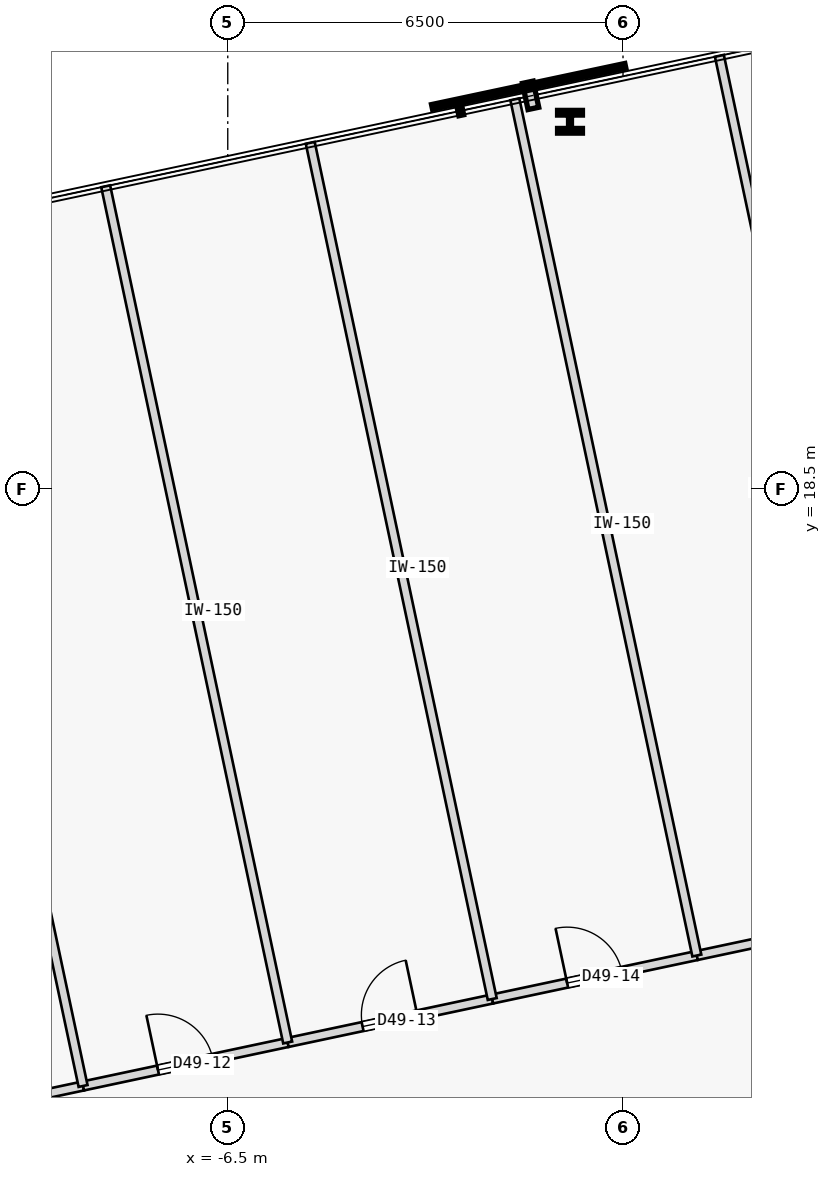
"""IFC4 building model, lengths in metres.
Left out: names, types, materials, properties, quantities, classifications, styles, units other than length and angle.
Written with IfcOpenShell. Run it as: python <this file> out.ifc"""

import sys

from ifc_helpers import new_model, si_unit, direction, frame, frame_2d, origin, origin_2d, place, context, subcontext, project, spatial, rectangle, i_section, extrude, element, fill, save


model = new_model("IFC4")
c1 = context("Model", 3, precision=1e-05, world=origin(), true_north=direction((0.0, 1.0)))
c2 = subcontext(c1, "Body", "Model", "MODEL_VIEW")
j1 = project(units=[si_unit("LENGTHUNIT", "METRE"), si_unit("PLANEANGLEUNIT", "RADIAN")], contexts=[c1])
p1 = place(None, origin())
s1 = spatial("IfcSite", under=j1, at=p1, CompositionType="ELEMENT")
p2 = place(p1, origin())
s2 = spatial("IfcBuilding", under=s1, at=p2, CompositionType="ELEMENT")
p3 = place(p2, frame((0.0, 0.0, 188.8)))
s3 = spatial("IfcBuildingStorey", under=s2, at=p3, CompositionType="ELEMENT", Elevation=188.8)
p4 = place(p3, frame((-0.872, 24.543, 0.0), z_axis=(0.0, 0.0, 1.0), x_axis=(1.0, 0.0, 0.0)))
e1 = element("IfcColumn", 1, at=p4, inside=s3, PredefinedType="COLUMN", context=c2, shape_type="SweptSolid", body=[
    extrude(i_section(OverallWidth=0.409, OverallDepth=0.374, WebThickness=0.048, FlangeThickness=0.077, FilletRadius=0.015, at=origin_2d()), origin(), (0.0, 0.0, 1.0), 3.4),
])
p5 = place(p3, frame((-12.243, 7.971, 0.0), z_axis=(0.0, 0.0, 1.0), x_axis=(0.978144956759, 0.207924129352, 0.0)))
e2 = element("IfcWall", 2, at=p5, inside=s3, PredefinedType="PARTITIONING", context=c2, shape_type="SweptSolid", body=[
    extrude(rectangle(XDim=3.439, YDim=0.15, at=frame_2d((1.72, 0.0))), origin(), (0.0, 0.0, 1.0), 3.175),
])
p6 = place(p5, frame((1.26, 0.0, 0.0)))
e3 = element("IfcOpeningElement", 3, at=p6, cuts=e2, PredefinedType="OPENING", context=c2, shape_type="SweptSolid", body=[
    extrude(rectangle(XDim=0.92, YDim=2.15, at=frame_2d((0.46, 1.075))), frame((0.0, 0.085, 0.0), z_axis=(0.0, -1.0, 0.0), x_axis=(1.0, 0.0, 0.0)), (0.0, 0.0, 1.0), 0.17),
])
p7 = place(p3, frame((-8.879, 8.687, 0.0), z_axis=(0.0, 0.0, 1.0), x_axis=(0.978154160849, 0.207880825506, 0.0)))
e4 = element("IfcWall", 4, at=p7, inside=s3, PredefinedType="PARTITIONING", context=c2, shape_type="SweptSolid", body=[
    extrude(rectangle(XDim=3.44, YDim=0.15, at=frame_2d((1.72, 0.0))), origin(), (0.0, 0.0, 1.0), 3.175),
])
p8 = place(p7, frame((1.26, 0.0, 0.0)))
e5 = element("IfcOpeningElement", 5, at=p8, cuts=e4, PredefinedType="OPENING", context=c2, shape_type="SweptSolid", body=[
    extrude(rectangle(XDim=0.92, YDim=2.15, at=frame_2d((0.46, 1.075))), frame((0.0, 0.085, 0.0), z_axis=(0.0, -1.0, 0.0), x_axis=(1.0, 0.0, 0.0)), (0.0, 0.0, 1.0), 0.17),
])
p9 = place(p3, frame((-5.515, 9.402, 0.0), z_axis=(0.0, 0.0, 1.0), x_axis=(0.978141887451, 0.207938567887, 0.0)))
e6 = element("IfcWall", 6, at=p9, inside=s3, PredefinedType="PARTITIONING", context=c2, shape_type="SweptSolid", body=[
    extrude(rectangle(XDim=3.439, YDim=0.15, at=frame_2d((1.719, 0.0))), origin(), (0.0, 0.0, 1.0), 3.175),
])
p10 = place(p9, frame((1.26, 0.0, 0.0)))
e7 = element("IfcOpeningElement", 7, at=p10, cuts=e6, PredefinedType="OPENING", context=c2, shape_type="SweptSolid", body=[
    extrude(rectangle(XDim=0.92, YDim=2.15, at=frame_2d((0.46, 1.075))), frame((0.0, 0.085, 0.0), z_axis=(0.0, -1.0, 0.0), x_axis=(1.0, 0.0, 0.0)), (0.0, 0.0, 1.0), 0.17),
])
p11 = place(p3, frame((-2.151, 10.117, 0.0), z_axis=(0.0, 0.0, 1.0), x_axis=(0.978157227602, 0.207866394808, 0.0)))
e8 = element("IfcWall", 8, at=p11, inside=s3, PredefinedType="PARTITIONING", context=c2, shape_type="SweptSolid", body=[
    extrude(rectangle(XDim=3.44, YDim=0.15, at=frame_2d((1.72, 0.0))), origin(), (0.0, 0.0, 1.0), 3.175),
])
p12 = place(p11, frame((1.26, 0.0, 0.0)))
e9 = element("IfcOpeningElement", 9, at=p12, cuts=e8, PredefinedType="OPENING", context=c2, shape_type="SweptSolid", body=[
    extrude(rectangle(XDim=0.92, YDim=2.15, at=frame_2d((0.46, 1.075))), frame((0.0, 0.085, 0.0), z_axis=(0.0, -1.0, 0.0), x_axis=(1.0, 0.0, 0.0)), (0.0, 0.0, 1.0), 0.17),
])
p13 = place(p3, frame((1.214, 10.832, 0.0), z_axis=(0.0, 0.0, 1.0), x_axis=(0.978141887451, 0.207938567887, 0.0)))
e10 = element("IfcWall", 10, at=p13, inside=s3, PredefinedType="PARTITIONING", context=c2, shape_type="SweptSolid", body=[
    extrude(rectangle(XDim=3.439, YDim=0.15, at=frame_2d((1.719, 0.0))), origin(), (0.0, 0.0, 1.0), 3.175),
])
p14 = place(p13, frame((1.26, 0.0, 0.0)))
e11 = element("IfcOpeningElement", 11, at=p14, cuts=e10, PredefinedType="OPENING", context=c2, shape_type="SweptSolid", body=[
    extrude(rectangle(XDim=0.92, YDim=2.15, at=frame_2d((0.46, 1.075))), frame((0.0, 0.085, 0.0), z_axis=(0.0, -1.0, 0.0), x_axis=(1.0, 0.0, 0.0)), (0.0, 0.0, 1.0), 0.17),
])
p15 = place(p3, frame((-8.879, 8.687, 0.0), z_axis=(0.0, 0.0, 1.0), x_axis=(-0.207915348705, 0.978146823219, 0.0)))
e12 = element("IfcWall", 12, at=p15, inside=s3, PredefinedType="PARTITIONING", context=c2, shape_type="SweptSolid", body=[
    extrude(rectangle(XDim=14.395, YDim=0.15, at=frame_2d((7.197, 0.0))), origin(), (0.0, 0.0, 1.0), 3.175),
])
p16 = place(p3, frame((-5.515, 9.402, 0.0), z_axis=(0.0, 0.0, 1.0), x_axis=(-0.207911899531, 0.97814755637, 0.0)))
e13 = element("IfcWall", 13, at=p16, inside=s3, PredefinedType="PARTITIONING", context=c2, shape_type="SweptSolid", body=[
    extrude(rectangle(XDim=14.395, YDim=0.15, at=frame_2d((7.198, 0.0))), origin(), (0.0, 0.0, 1.0), 3.175),
])
p17 = place(p3, frame((-2.151, 10.117, 0.0), z_axis=(0.0, 0.0, 1.0), x_axis=(-0.207915348705, 0.978146823219, 0.0)))
e14 = element("IfcWall", 14, at=p17, inside=s3, PredefinedType="PARTITIONING", context=c2, shape_type="SweptSolid", body=[
    extrude(rectangle(XDim=14.395, YDim=0.15, at=frame_2d((7.197, 0.0))), origin(), (0.0, 0.0, 1.0), 3.175),
])
p18 = place(p3, frame((1.214, 10.832, 0.0), z_axis=(0.0, 0.0, 1.0), x_axis=(-0.207911899531, 0.97814755637, 0.0)))
e15 = element("IfcWall", 15, at=p18, inside=s3, PredefinedType="PARTITIONING", context=c2, shape_type="SweptSolid", body=[
    extrude(rectangle(XDim=14.395, YDim=0.15, at=frame_2d((7.198, 0.0))), origin(), (0.0, 0.0, 1.0), 3.175),
])
p19 = place(p3, frame((4.578, 11.547, 0.0), z_axis=(0.0, 0.0, 1.0), x_axis=(-0.207911899531, 0.97814755637, 0.0)))
e16 = element("IfcWall", 16, at=p19, inside=s3, PredefinedType="PARTITIONING", context=c2, shape_type="SweptSolid", body=[
    extrude(rectangle(XDim=14.395, YDim=0.15, at=frame_2d((7.198, 0.0))), origin(), (0.0, 0.0, 1.0), 2.725),
])
p20 = place(p8, origin())
e17 = element("IfcDoor", 17, at=p20, inside=s3, OperationType="SINGLE_SWING_LEFT", PredefinedType="DOOR", context=c2, shape_type="SweptSolid", body=[
    extrude(rectangle(XDim=0.92, YDim=2.15, at=frame_2d((0.46, 1.075))), frame((0.0, 0.025, 0.0), z_axis=(0.0, -1.0, 0.0), x_axis=(1.0, 0.0, 0.0)), (0.0, 0.0, 1.0), 0.05),
])
fill(e5, e17)
p21 = place(p10, origin())
e18 = element("IfcDoor", 18, at=p21, inside=s3, OperationType="SINGLE_SWING_RIGHT", PredefinedType="DOOR", context=c2, shape_type="SweptSolid", body=[
    extrude(rectangle(XDim=0.92, YDim=2.15, at=frame_2d((0.46, 1.075))), frame((0.0, 0.025, 0.0), z_axis=(0.0, -1.0, 0.0), x_axis=(1.0, 0.0, 0.0)), (0.0, 0.0, 1.0), 0.05),
])
fill(e7, e18)
p22 = place(p12, origin())
e19 = element("IfcDoor", 19, at=p22, inside=s3, OperationType="SINGLE_SWING_LEFT", PredefinedType="DOOR", context=c2, shape_type="SweptSolid", body=[
    extrude(rectangle(XDim=0.92, YDim=2.15, at=frame_2d((0.46, 1.075))), frame((0.0, 0.025, 0.0), z_axis=(0.0, -1.0, 0.0), x_axis=(1.0, 0.0, 0.0)), (0.0, 0.0, 1.0), 0.05),
])
fill(e9, e19)
save(model, sys.argv[1])
